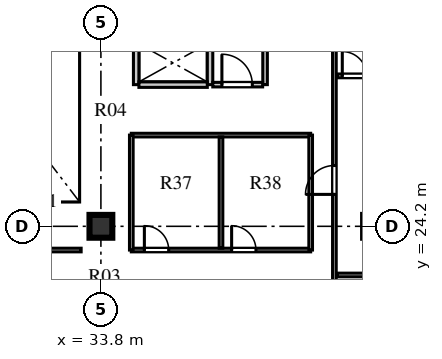
"""IFC4 building model, lengths in metres.
Left out: names, types, materials, properties, quantities, classifications, styles, units other than length and angle.
Written with IfcOpenShell. Run it as: python <this file> out.ifc"""

import sys

from ifc_helpers import new_model, si_unit, direction, frame, frame_2d, origin, origin_2d, place, context, subcontext, project, spatial, rectangle, extrude, element, fill, save


model = new_model("IFC4")
c1 = context("Model", 3, precision=1e-05, world=origin(), true_north=direction((0.0, 1.0)))
c2 = subcontext(c1, "Body", "Model", "MODEL_VIEW")
j1 = project(units=[si_unit("LENGTHUNIT", "METRE"), si_unit("PLANEANGLEUNIT", "RADIAN")], contexts=[c1])
p1 = place(None, origin())
s1 = spatial("IfcSite", under=j1, at=p1, CompositionType="ELEMENT")
p2 = place(p1, origin())
s2 = spatial("IfcBuilding", under=s1, at=p2, CompositionType="ELEMENT")
p3 = place(p2, frame((0.0, 0.0, 288.2)))
s3 = spatial("IfcBuildingStorey", under=s2, at=p3, CompositionType="ELEMENT", Elevation=288.2)
p4 = place(p3, frame((33.8, 24.2, 0.0), z_axis=(0.0, 0.0, 1.0), x_axis=(1.0, 0.0, 0.0)))
e1 = element("IfcColumn", 1, at=p4, inside=s3, PredefinedType="COLUMN", context=c2, shape_type="SweptSolid", body=[
    extrude(rectangle(XDim=0.75, YDim=0.75, at=origin_2d()), origin(), (0.0, 0.0, 1.0), 3.66),
])
p5 = place(p3, frame((34.96, 28.86, 0.0), z_axis=(0.0, 0.0, 1.0), x_axis=(0.0, 1.0, 0.0)))
e2 = element("IfcWall", 2, at=p5, inside=s3, PredefinedType="SOLIDWALL", context=c2, shape_type="SweptSolid", body=[
    extrude(rectangle(XDim=4.22, YDim=0.18, at=frame_2d((2.11, 0.0))), origin(), (0.0, 0.0, 1.0), 3.66),
])
p6 = place(p3, frame((37.39, 28.86, 0.0), z_axis=(0.0, 0.0, 1.0), x_axis=(0.0, 1.0, 0.0)))
e3 = element("IfcWall", 3, at=p6, inside=s3, PredefinedType="SOLIDWALL", context=c2, shape_type="SweptSolid", body=[
    extrude(rectangle(XDim=4.22, YDim=0.18, at=frame_2d((2.11, 0.0))), origin(), (0.0, 0.0, 1.0), 3.66),
])
p7 = place(p6, frame((2.1, 0.0, 0.0)))
e4 = element("IfcOpeningElement", 4, at=p7, cuts=e3, PredefinedType="OPENING", context=c2, shape_type="SweptSolid", body=[
    extrude(rectangle(XDim=1.2, YDim=2.12, at=frame_2d((0.6, 1.06))), frame((0.0, 0.1, 0.0), z_axis=(0.0, -1.0, 0.0), x_axis=(1.0, 0.0, 0.0)), (0.0, 0.0, 1.0), 0.2),
])
p8 = place(p3, frame((35.05, 28.86, 0.0), z_axis=(0.0, 0.0, 1.0), x_axis=(1.0, 0.0, 0.0)))
e5 = element("IfcWall", 5, at=p8, inside=s3, PredefinedType="SOLIDWALL", context=c2, shape_type="SweptSolid", body=[
    extrude(rectangle(XDim=2.25, YDim=0.18, at=frame_2d((1.125, 0.0))), origin(), (0.0, 0.0, 1.0), 3.66),
])
p9 = place(p3, frame((39.2, 28.86, 0.0), z_axis=(0.0, 0.0, 1.0), x_axis=(0.0, 1.0, 0.0)))
e6 = element("IfcWall", 6, at=p9, inside=s3, PredefinedType="PARTITIONING", context=c2, shape_type="SweptSolid", body=[
    extrude(rectangle(XDim=4.22, YDim=0.15, at=frame_2d((2.11, 0.0))), origin(), (0.0, 0.0, 1.0), 3.66),
])
p10 = place(p3, frame((37.48, 28.86, 0.0), z_axis=(0.0, 0.0, 1.0), x_axis=(1.0, 0.0, 0.0)))
e7 = element("IfcWall", 7, at=p10, inside=s3, PredefinedType="PARTITIONING", context=c2, shape_type="SweptSolid", body=[
    extrude(rectangle(XDim=1.64, YDim=0.15, at=frame_2d((0.82, 0.0))), origin(), (0.0, 0.0, 1.0), 3.66),
])
p11 = place(p10, frame((0.3, 0.0, 0.0)))
e8 = element("IfcOpeningElement", 8, at=p11, cuts=e7, PredefinedType="OPENING", context=c2, shape_type="SweptSolid", body=[
    extrude(rectangle(XDim=1.0, YDim=2.1, at=frame_2d((0.5, 1.05))), frame((0.0, 0.085, 0.0), z_axis=(0.0, -1.0, 0.0), x_axis=(1.0, 0.0, 0.0)), (0.0, 0.0, 1.0), 0.17),
])
p12 = place(p3, frame((27.15, 23.42, 0.0), z_axis=(0.0, 0.0, 1.0), x_axis=(1.0, 0.0, 0.0)))
e9 = element("IfcWall", 9, at=p12, inside=s3, PredefinedType="PARTITIONING", context=c2, shape_type="SweptSolid", body=[
    extrude(rectangle(XDim=6.0, YDim=0.12, at=frame_2d((3.0, 0.0))), origin(), (0.0, 0.0, 1.0), 3.66),
])
p13 = place(p3, frame((41.48, 15.35, 0.0), z_axis=(0.0, 0.0, 1.0), x_axis=(0.0, 1.0, 0.0)))
e10 = element("IfcWall", 10, at=p13, inside=s3, PredefinedType="PARTITIONING", context=c2, shape_type="SweptSolid", body=[
    extrude(rectangle(XDim=26.5, YDim=0.12, at=frame_2d((13.25, 0.0))), origin(), (0.0, 0.0, 1.0), 3.66),
])
p14 = place(p13, frame((0.75, 0.0, 0.0)))
e11 = element("IfcOpeningElement", 11, at=p14, cuts=e10, PredefinedType="OPENING", context=c2, shape_type="SweptSolid", body=[
    extrude(rectangle(XDim=0.95, YDim=2.1, at=frame_2d((0.475, 1.05))), frame((0.0, 0.07, 0.0), z_axis=(0.0, -1.0, 0.0), x_axis=(1.0, 0.0, 0.0)), (0.0, 0.0, 1.0), 0.14),
])
p15 = place(p13, frame((9.9, 0.0, 0.0)))
e12 = element("IfcOpeningElement", 12, at=p15, cuts=e10, PredefinedType="OPENING", context=c2, shape_type="SweptSolid", body=[
    extrude(rectangle(XDim=0.95, YDim=2.1, at=frame_2d((0.475, 1.05))), frame((0.0, 0.07, 0.0), z_axis=(0.0, -1.0, 0.0), x_axis=(1.0, 0.0, 0.0)), (0.0, 0.0, 1.0), 0.14),
])
p16 = place(p13, frame((18.35, 0.0, 0.0)))
e13 = element("IfcOpeningElement", 13, at=p16, cuts=e10, PredefinedType="OPENING", context=c2, shape_type="SweptSolid", body=[
    extrude(rectangle(XDim=0.95, YDim=2.1, at=frame_2d((0.475, 1.05))), frame((0.0, 0.07, 0.0), z_axis=(0.0, -1.0, 0.0), x_axis=(1.0, 0.0, 0.0)), (0.0, 0.0, 1.0), 0.14),
])
p17 = place(p3, frame((41.56, 22.6, 0.0), z_axis=(0.0, 0.0, 1.0), x_axis=(1.0, 0.0, 0.0)))
e14 = element("IfcWall", 14, at=p17, inside=s3, PredefinedType="PARTITIONING", context=c2, shape_type="SweptSolid", body=[
    extrude(rectangle(XDim=6.36, YDim=0.12, at=frame_2d((3.18, 0.0))), origin(), (0.0, 0.0, 1.0), 3.66),
])
p18 = place(p3, frame((41.58, 29.148, 0.0), z_axis=(0.0, 0.0, 1.0), x_axis=(1.0, 0.0, 0.0)))
e15 = element("IfcWall", 15, at=p18, inside=s3, PredefinedType="PLUMBINGWALL", context=c2, shape_type="SweptSolid", body=[
    extrude(rectangle(XDim=3.344, YDim=0.125, at=frame_2d((1.672, 0.0))), origin(), (0.0, 0.0, 1.0), 3.66),
])
p19 = place(p18, frame((0.16, 0.0, 0.0)))
e16 = element("IfcOpeningElement", 16, at=p19, cuts=e15, PredefinedType="OPENING", context=c2, shape_type="SweptSolid", body=[
    extrude(rectangle(XDim=0.8, YDim=2.05, at=frame_2d((0.4, 1.025))), frame((0.0, 0.073, 0.0), z_axis=(0.0, -1.0, 0.0), x_axis=(1.0, 0.0, 0.0)), (0.0, 0.0, 1.0), 0.145),
])
p20 = place(p18, frame((1.865, 0.0, 0.0)))
e17 = element("IfcOpeningElement", 17, at=p20, cuts=e15, PredefinedType="OPENING", context=c2, shape_type="SweptSolid", body=[
    extrude(rectangle(XDim=0.8, YDim=2.05, at=frame_2d((0.4, 1.025))), frame((0.0, 0.073, 0.0), z_axis=(0.0, -1.0, 0.0), x_axis=(1.0, 0.0, 0.0)), (0.0, 0.0, 1.0), 0.145),
])
p21 = place(p3, frame((34.8, 23.42, 0.0), z_axis=(0.0, 0.0, 1.0), x_axis=(1.0, 0.0, 0.0)))
e18 = element("IfcWall", 18, at=p21, inside=s3, PredefinedType="PARTITIONING", context=c2, shape_type="SweptSolid", body=[
    extrude(rectangle(XDim=5.9, YDim=0.12, at=frame_2d((2.95, 0.0))), origin(), (0.0, 0.0, 1.0), 3.66),
])
p22 = place(p21, frame((0.43, 0.0, 0.0)))
e19 = element("IfcOpeningElement", 19, at=p22, cuts=e18, PredefinedType="OPENING", context=c2, shape_type="SweptSolid", body=[
    extrude(rectangle(XDim=0.8, YDim=2.05, at=frame_2d((0.4, 1.025))), frame((0.0, 0.07, 0.0), z_axis=(0.0, -1.0, 0.0), x_axis=(1.0, 0.0, 0.0)), (0.0, 0.0, 1.0), 0.14),
])
p23 = place(p21, frame((3.3, 0.0, 0.0)))
e20 = element("IfcOpeningElement", 20, at=p23, cuts=e18, PredefinedType="OPENING", context=c2, shape_type="SweptSolid", body=[
    extrude(rectangle(XDim=0.8, YDim=2.05, at=frame_2d((0.4, 1.025))), frame((0.0, 0.07, 0.0), z_axis=(0.0, -1.0, 0.0), x_axis=(1.0, 0.0, 0.0)), (0.0, 0.0, 1.0), 0.14),
])
p24 = place(p3, frame((34.8, 27.2, 0.0), z_axis=(0.0, 0.0, 1.0), x_axis=(1.0, 0.0, 0.0)))
e21 = element("IfcWall", 21, at=p24, inside=s3, PredefinedType="PARTITIONING", context=c2, shape_type="SweptSolid", body=[
    extrude(rectangle(XDim=5.9, YDim=0.12, at=frame_2d((2.95, 0.0))), origin(), (0.0, 0.0, 1.0), 3.36),
])
for number, where, z_axis, x_axis in (
    (22, (34.8, 23.42, 0.0), (0.0, 0.0, 1.0), (0.0, 1.0, 0.0)),
    (23, (40.7, 23.42, 0.0), (0.0, 0.0, 1.0), (0.0, 1.0, 0.0)),
):
    element("IfcWall", number, at=place(p3, frame(where, z_axis=z_axis, x_axis=x_axis)), inside=s3, PredefinedType="PARTITIONING", context=c2, shape_type="SweptSolid", body=[
        extrude(rectangle(XDim=3.78, YDim=0.12, at=frame_2d((1.89, 0.0))), origin(), (0.0, 0.0, 1.0), 3.66),
    ])
p25 = place(p3, frame((37.75, 23.48, 0.0), z_axis=(0.0, 0.0, 1.0), x_axis=(0.0, 1.0, 0.0)))
e24 = element("IfcWall", 24, at=p25, inside=s3, PredefinedType="PARTITIONING", context=c2, shape_type="SweptSolid", body=[
    extrude(rectangle(XDim=3.66, YDim=0.12, at=frame_2d((1.83, 0.0))), origin(), (0.0, 0.0, 1.0), 3.66),
])
p26 = place(p11, origin())
e25 = element("IfcDoor", 25, at=p26, inside=s3, OperationType="SINGLE_SWING_LEFT", PredefinedType="DOOR", context=c2, shape_type="SweptSolid", body=[
    extrude(rectangle(XDim=1.0, YDim=2.1, at=frame_2d((0.5, 1.05))), frame((0.0, 0.025, 0.0), z_axis=(0.0, -1.0, 0.0), x_axis=(1.0, 0.0, 0.0)), (0.0, 0.0, 1.0), 0.05),
])
fill(e8, e25)
p27 = place(p19, origin())
e26 = element("IfcDoor", 26, at=p27, inside=s3, OperationType="SINGLE_SWING_LEFT", PredefinedType="DOOR", context=c2, shape_type="SweptSolid", body=[
    extrude(rectangle(XDim=0.8, YDim=2.05, at=frame_2d((0.4, 1.025))), frame((0.0, 0.025, 0.0), z_axis=(0.0, -1.0, 0.0), x_axis=(1.0, 0.0, 0.0)), (0.0, 0.0, 1.0), 0.05),
])
fill(e16, e26)
p28 = place(p15, origin())
e27 = element("IfcDoor", 27, at=p28, inside=s3, OperationType="SINGLE_SWING_LEFT", PredefinedType="DOOR", context=c2, shape_type="SweptSolid", body=[
    extrude(rectangle(XDim=0.95, YDim=2.1, at=frame_2d((0.475, 1.05))), frame((0.0, 0.025, 0.0), z_axis=(0.0, -1.0, 0.0), x_axis=(1.0, 0.0, 0.0)), (0.0, 0.0, 1.0), 0.05),
])
fill(e12, e27)
p29 = place(p22, origin())
e28 = element("IfcDoor", 28, at=p29, inside=s3, OperationType="SINGLE_SWING_LEFT", PredefinedType="DOOR", context=c2, shape_type="SweptSolid", body=[
    extrude(rectangle(XDim=0.8, YDim=2.05, at=frame_2d((0.4, 1.025))), frame((0.0, 0.025, 0.0), z_axis=(0.0, -1.0, 0.0), x_axis=(1.0, 0.0, 0.0)), (0.0, 0.0, 1.0), 0.05),
])
fill(e19, e28)
p30 = place(p23, origin())
e29 = element("IfcDoor", 29, at=p30, inside=s3, OperationType="SINGLE_SWING_LEFT", PredefinedType="DOOR", context=c2, shape_type="SweptSolid", body=[
    extrude(rectangle(XDim=0.8, YDim=2.05, at=frame_2d((0.4, 1.025))), frame((0.0, 0.025, 0.0), z_axis=(0.0, -1.0, 0.0), x_axis=(1.0, 0.0, 0.0)), (0.0, 0.0, 1.0), 0.05),
])
fill(e20, e29)
save(model, sys.argv[1])
